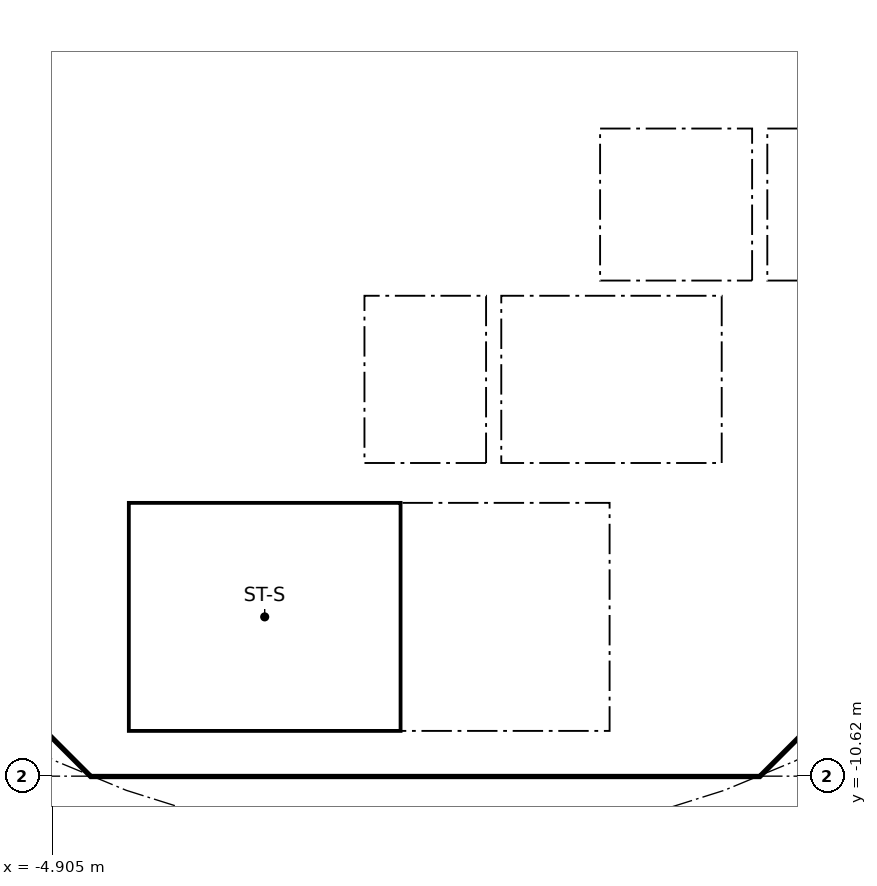
"""IFC4 building model, lengths in metres.
Left out: names, types, materials, properties, quantities, classifications, styles, units other than length and angle.
Written with IfcOpenShell. Run it as: python <this file> out.ifc"""

import sys

from ifc_helpers import new_model, si_unit, direction, frame, frame_2d, origin, place, context, subcontext, project, spatial, polyline, rectangle, outline, extrude, element, fill, save


model = new_model("IFC4")
c1 = context("Model", 3, precision=1e-05, world=origin(), true_north=direction((0.0, 1.0)))
c2 = subcontext(c1, "Body", "Model", "MODEL_VIEW")
j1 = project(units=[si_unit("LENGTHUNIT", "METRE"), si_unit("PLANEANGLEUNIT", "RADIAN")], contexts=[c1])
p1 = place(None, origin())
s1 = spatial("IfcSite", under=j1, at=p1, CompositionType="ELEMENT")
p2 = place(p1, origin())
s2 = spatial("IfcBuilding", under=s1, at=p2, CompositionType="ELEMENT")
p3 = place(p2, frame((0.0, 0.0, 273.3)))
s3 = spatial("IfcBuildingStorey", under=s2, at=p3, CompositionType="ELEMENT", Elevation=273.3)
p4 = place(p3, frame((-9.988, -4.613, 0.0), z_axis=(0.0, 0.0, 1.0), x_axis=(0.707106781187, -0.707106781187, 0.0)))
e1 = element("IfcWall", 1, at=p4, inside=s3, PredefinedType="SHEAR", context=c2, shape_type="SweptSolid", body=[
    extrude(rectangle(XDim=7.602, YDim=0.6, at=frame_2d((3.801, 0.0))), origin(), (0.0, 0.0, 1.0), 3.44),
])
p5 = place(p4, frame((6.151, 0.0, 0.0)))
e2 = element("IfcOpeningElement", 2, at=p5, cuts=e1, PredefinedType="OPENING", context=c2, shape_type="SweptSolid", body=[
    extrude(rectangle(XDim=1.1, YDim=2.1, at=frame_2d((0.55, 1.05))), frame((0.0, 0.31, 0.0), z_axis=(0.0, -1.0, 0.0), x_axis=(1.0, 0.0, 0.0)), (0.0, 0.0, 1.0), 0.62),
])
p6 = place(p3, frame((4.613, -9.988, 0.0), z_axis=(0.0, 0.0, 1.0), x_axis=(0.707106781187, 0.707106781187, 0.0)))
e3 = element("IfcWall", 3, at=p6, inside=s3, PredefinedType="SHEAR", context=c2, shape_type="SweptSolid", body=[
    extrude(rectangle(XDim=7.602, YDim=0.6, at=frame_2d((3.801, 0.0))), origin(), (0.0, 0.0, 1.0), 3.44),
])
p7 = place(p6, frame((3.201, 0.0, 0.0)))
e4 = element("IfcOpeningElement", 4, at=p7, cuts=e3, PredefinedType="OPENING", context=c2, shape_type="SweptSolid", body=[
    extrude(rectangle(XDim=1.2, YDim=2.1, at=frame_2d((0.6, 1.05))), frame((0.0, 0.31, 0.0), z_axis=(0.0, -1.0, 0.0), x_axis=(1.0, 0.0, 0.0)), (0.0, 0.0, 1.0), 0.62),
])
p8 = place(p3, frame((4.0, -10.025, 0.0), z_axis=(0.0, 0.0, 1.0), x_axis=(0.0, 1.0, 0.0)))
e5 = element("IfcWall", 5, at=p8, inside=s3, PredefinedType="SOLIDWALL", context=c2, shape_type="SweptSolid", body=[
    extrude(rectangle(XDim=3.0, YDim=0.2, at=frame_2d((1.5, 0.0))), origin(), (0.0, 0.0, 1.0), 3.44),
])
p9 = place(p8, frame((0.975, 0.0, 0.0)))
e6 = element("IfcOpeningElement", 6, at=p9, cuts=e5, PredefinedType="OPENING", context=c2, shape_type="SweptSolid", body=[
    extrude(rectangle(XDim=1.1, YDim=2.1, at=frame_2d((0.55, 1.05))), frame((0.0, 0.11, 0.0), z_axis=(0.0, -1.0, 0.0), x_axis=(1.0, 0.0, 0.0)), (0.0, 0.0, 1.0), 0.22),
])
p10 = place(p3, frame((4.0, -6.5, 0.0), z_axis=(0.0, 0.0, 1.0), x_axis=(0.0, 1.0, 0.0)))
e7 = element("IfcWall", 7, at=p10, inside=s3, PredefinedType="SOLIDWALL", context=c2, shape_type="SweptSolid", body=[
    extrude(rectangle(XDim=2.2, YDim=0.2, at=frame_2d((1.1, 0.0))), origin(), (0.0, 0.0, 1.0), 3.44),
])
p11 = place(p10, frame((0.55, 0.0, 0.0)))
e8 = element("IfcOpeningElement", 8, at=p11, cuts=e7, PredefinedType="OPENING", context=c2, shape_type="SweptSolid", body=[
    extrude(rectangle(XDim=1.1, YDim=2.1, at=frame_2d((0.55, 1.05))), frame((0.0, 0.11, 0.0), z_axis=(0.0, -1.0, 0.0), x_axis=(1.0, 0.0, 0.0)), (0.0, 0.0, 1.0), 0.22),
])
p12 = place(p3, frame((-4.0, -6.5, 0.0), z_axis=(0.0, 0.0, 1.0), x_axis=(0.0, 1.0, 0.0)))
e9 = element("IfcWall", 9, at=p12, inside=s3, PredefinedType="SOLIDWALL", context=c2, shape_type="SweptSolid", body=[
    extrude(rectangle(XDim=2.2, YDim=0.2, at=frame_2d((1.1, 0.0))), origin(), (0.0, 0.0, 1.0), 3.44),
])
p13 = place(p12, frame((0.65, 0.0, 0.0)))
e10 = element("IfcOpeningElement", 10, at=p13, cuts=e9, PredefinedType="OPENING", context=c2, shape_type="SweptSolid", body=[
    extrude(rectangle(XDim=0.9, YDim=2.1, at=frame_2d((0.45, 1.05))), frame((0.0, 0.11, 0.0), z_axis=(0.0, -1.0, 0.0), x_axis=(1.0, 0.0, 0.0)), (0.0, 0.0, 1.0), 0.22),
])
p14 = place(p3, frame((-6.7, -2.0, 0.0), z_axis=(0.0, 0.0, 1.0), x_axis=(1.0, 0.0, 0.0)))
e11 = element("IfcWall", 11, at=p14, inside=s3, PredefinedType="SOLIDWALL", context=c2, shape_type="SweptSolid", body=[
    extrude(rectangle(XDim=13.4, YDim=0.2, at=frame_2d((6.7, 0.0))), origin(), (0.0, 0.0, 1.0), 3.44),
])
p15 = place(p14, frame((9.45, 0.0, 0.0)))
e12 = element("IfcOpeningElement", 12, at=p15, cuts=e11, PredefinedType="OPENING", context=c2, shape_type="SweptSolid", body=[
    extrude(rectangle(XDim=1.1, YDim=2.1, at=frame_2d((0.55, 1.05))), frame((0.0, 0.11, 0.0), z_axis=(0.0, -1.0, 0.0), x_axis=(1.0, 0.0, 0.0)), (0.0, 0.0, 1.0), 0.22),
])
p16 = place(p14, frame((11.65, 0.0, 0.0)))
e13 = element("IfcOpeningElement", 13, at=p16, cuts=e11, PredefinedType="OPENING", context=c2, shape_type="SweptSolid", body=[
    extrude(rectangle(XDim=1.1, YDim=2.1, at=frame_2d((0.55, 1.05))), frame((0.0, 0.11, 0.0), z_axis=(0.0, -1.0, 0.0), x_axis=(1.0, 0.0, 0.0)), (0.0, 0.0, 1.0), 0.22),
])
p17 = place(p14, frame((1.85, 0.0, 0.0)))
e14 = element("IfcOpeningElement", 14, at=p17, cuts=e11, PredefinedType="OPENING", context=c2, shape_type="SweptSolid", body=[
    extrude(rectangle(XDim=0.9, YDim=2.1, at=frame_2d((0.45, 1.05))), frame((0.0, 0.11, 0.0), z_axis=(0.0, -1.0, 0.0), x_axis=(1.0, 0.0, 0.0)), (0.0, 0.0, 1.0), 0.22),
])
p18 = place(p14, frame((6.25, 0.0, 0.0)))
e15 = element("IfcOpeningElement", 15, at=p18, cuts=e11, PredefinedType="OPENING", context=c2, shape_type="SweptSolid", body=[
    extrude(rectangle(XDim=0.9, YDim=2.1, at=frame_2d((0.45, 1.05))), frame((0.0, 0.11, 0.0), z_axis=(0.0, -1.0, 0.0), x_axis=(1.0, 0.0, 0.0)), (0.0, 0.0, 1.0), 0.22),
])
p19 = place(p3, origin())
e16 = element("IfcWall", 16, at=p19, inside=s3, PredefinedType="SHEAR", context=c2, shape_type="SweptSolid", body=[
    extrude(outline(polyline([(-4.152, -10.025), (4.152, -10.025), (4.401, -9.776), (4.825, -10.2), (4.401, -10.625), (-4.401, -10.625), (-4.825, -10.2), (-4.401, -9.776), (-4.152, -10.025)])), origin(), (0.0, 0.0, 1.0), 3.44),
])
for number, where, z_axis, x_axis in (
    (17, (-0.9, -6.5, 0.0), (0.0, 0.0, 1.0), (0.0, 1.0, 0.0)),
    (18, (0.9, -6.5, 0.0), (0.0, 0.0, 1.0), (0.0, 1.0, 0.0)),
):
    element("IfcWall", number, at=place(p3, frame(where, z_axis=z_axis, x_axis=x_axis)), inside=s3, PredefinedType="SOLIDWALL", context=c2, shape_type="SweptSolid", body=[
        extrude(rectangle(XDim=2.2, YDim=0.2, at=frame_2d((1.1, 0.0))), origin(), (0.0, 0.0, 1.0), 3.44),
    ])
p20 = place(p3, origin())
e19 = element("IfcWall", 19, at=p20, inside=s3, PredefinedType="SOLIDWALL", context=c2, shape_type="SweptSolid", body=[
    extrude(outline(polyline([(-6.7, -2.1), (-6.5, -2.1), (-6.5, -4.1), (-2.3, -4.1), (-2.3, -2.1), (-2.1, -2.1), (-2.1, -4.1), (2.1, -4.1), (2.1, -2.1), (2.3, -2.1), (2.3, -4.1), (4.3, -4.1), (4.3, -2.1), (4.5, -2.1), (4.5, -4.1), (6.5, -4.1), (6.5, -2.1), (6.7, -2.1), (6.7, -4.3), (-6.7, -4.3), (-6.7, -2.1)])), origin(), (0.0, 0.0, 1.0), 3.44),
])
p21 = place(p3, origin())
e20 = element("IfcWall", 20, at=p21, inside=s3, PredefinedType="SOLIDWALL", context=c2, shape_type="SweptSolid", body=[
    extrude(outline(polyline([(-3.9, -10.025), (-4.1, -10.025), (-4.1, -7.025), (-3.9, -7.025), (-3.9, -10.025)])), origin(), (0.0, 0.0, 1.0), 3.44),
])
p22 = place(p3, origin())
e21 = element("IfcWall", 21, at=p22, inside=s3, PredefinedType="SOLIDWALL", context=c2, shape_type="SweptSolid", body=[
    extrude(outline(polyline([(4.1, -7.025), (-4.1, -7.025), (-4.1, -6.5), (4.1, -6.5), (4.1, -7.025)])), origin(), (0.0, 0.0, 1.0), 3.44),
])
p23 = place(p15, origin())
e22 = element("IfcDoor", 22, at=p23, inside=s3, OperationType="DOUBLE_DOOR_SLIDING", PredefinedType="DOOR", context=c2, shape_type="SweptSolid", body=[
    extrude(rectangle(XDim=1.1, YDim=2.1, at=frame_2d((0.55, 1.05))), frame((0.0, 0.025, 0.0), z_axis=(0.0, -1.0, 0.0), x_axis=(1.0, 0.0, 0.0)), (0.0, 0.0, 1.0), 0.05),
])
fill(e12, e22)
p24 = place(p11, origin())
e23 = element("IfcDoor", 23, at=p24, inside=s3, OperationType="DOUBLE_DOOR_SLIDING", PredefinedType="DOOR", context=c2, shape_type="SweptSolid", body=[
    extrude(rectangle(XDim=1.1, YDim=2.1, at=frame_2d((0.55, 1.05))), frame((0.0, 0.025, 0.0), z_axis=(0.0, -1.0, 0.0), x_axis=(1.0, 0.0, 0.0)), (0.0, 0.0, 1.0), 0.05),
])
fill(e8, e23)
p25 = place(p9, origin())
e24 = element("IfcDoor", 24, at=p25, inside=s3, OperationType="SINGLE_SWING_RIGHT", PredefinedType="DOOR", context=c2, shape_type="SweptSolid", body=[
    extrude(rectangle(XDim=1.1, YDim=2.1, at=frame_2d((0.55, 1.05))), frame((0.0, 0.025, 0.0), z_axis=(0.0, -1.0, 0.0), x_axis=(1.0, 0.0, 0.0)), (0.0, 0.0, 1.0), 0.05),
])
fill(e6, e24)
p26 = place(p13, frame((0.9, 0.0, 0.0), x_axis=(-1.0, 0.0, 0.0)))
e25 = element("IfcDoor", 25, at=p26, inside=s3, OperationType="SINGLE_SWING_RIGHT", PredefinedType="DOOR", context=c2, shape_type="SweptSolid", body=[
    extrude(rectangle(XDim=0.9, YDim=2.1, at=frame_2d((0.45, 1.05))), frame((0.0, 0.025, 0.0), z_axis=(0.0, -1.0, 0.0), x_axis=(1.0, 0.0, 0.0)), (0.0, 0.0, 1.0), 0.05),
])
fill(e10, e25)
p27 = place(p17, frame((0.9, 0.0, 0.0), x_axis=(-1.0, 0.0, 0.0)))
e26 = element("IfcDoor", 26, at=p27, inside=s3, OperationType="SINGLE_SWING_RIGHT", PredefinedType="DOOR", context=c2, shape_type="SweptSolid", body=[
    extrude(rectangle(XDim=0.9, YDim=2.1, at=frame_2d((0.45, 1.05))), frame((0.0, 0.025, 0.0), z_axis=(0.0, -1.0, 0.0), x_axis=(1.0, 0.0, 0.0)), (0.0, 0.0, 1.0), 0.05),
])
fill(e14, e26)
p28 = place(p18, frame((0.9, 0.0, 0.0), x_axis=(-1.0, 0.0, 0.0)))
e27 = element("IfcDoor", 27, at=p28, inside=s3, OperationType="SINGLE_SWING_RIGHT", PredefinedType="DOOR", context=c2, shape_type="SweptSolid", body=[
    extrude(rectangle(XDim=0.9, YDim=2.1, at=frame_2d((0.45, 1.05))), frame((0.0, 0.025, 0.0), z_axis=(0.0, -1.0, 0.0), x_axis=(1.0, 0.0, 0.0)), (0.0, 0.0, 1.0), 0.05),
])
fill(e15, e27)
p29 = place(p5, origin())
e28 = element("IfcDoor", 28, at=p29, inside=s3, OperationType="SINGLE_SWING_RIGHT", PredefinedType="DOOR", context=c2, shape_type="SweptSolid", body=[
    extrude(rectangle(XDim=1.1, YDim=2.1, at=frame_2d((0.55, 1.05))), frame((0.0, 0.025, 0.0), z_axis=(0.0, -1.0, 0.0), x_axis=(1.0, 0.0, 0.0)), (0.0, 0.0, 1.0), 0.05),
])
fill(e2, e28)
save(model, sys.argv[1])
